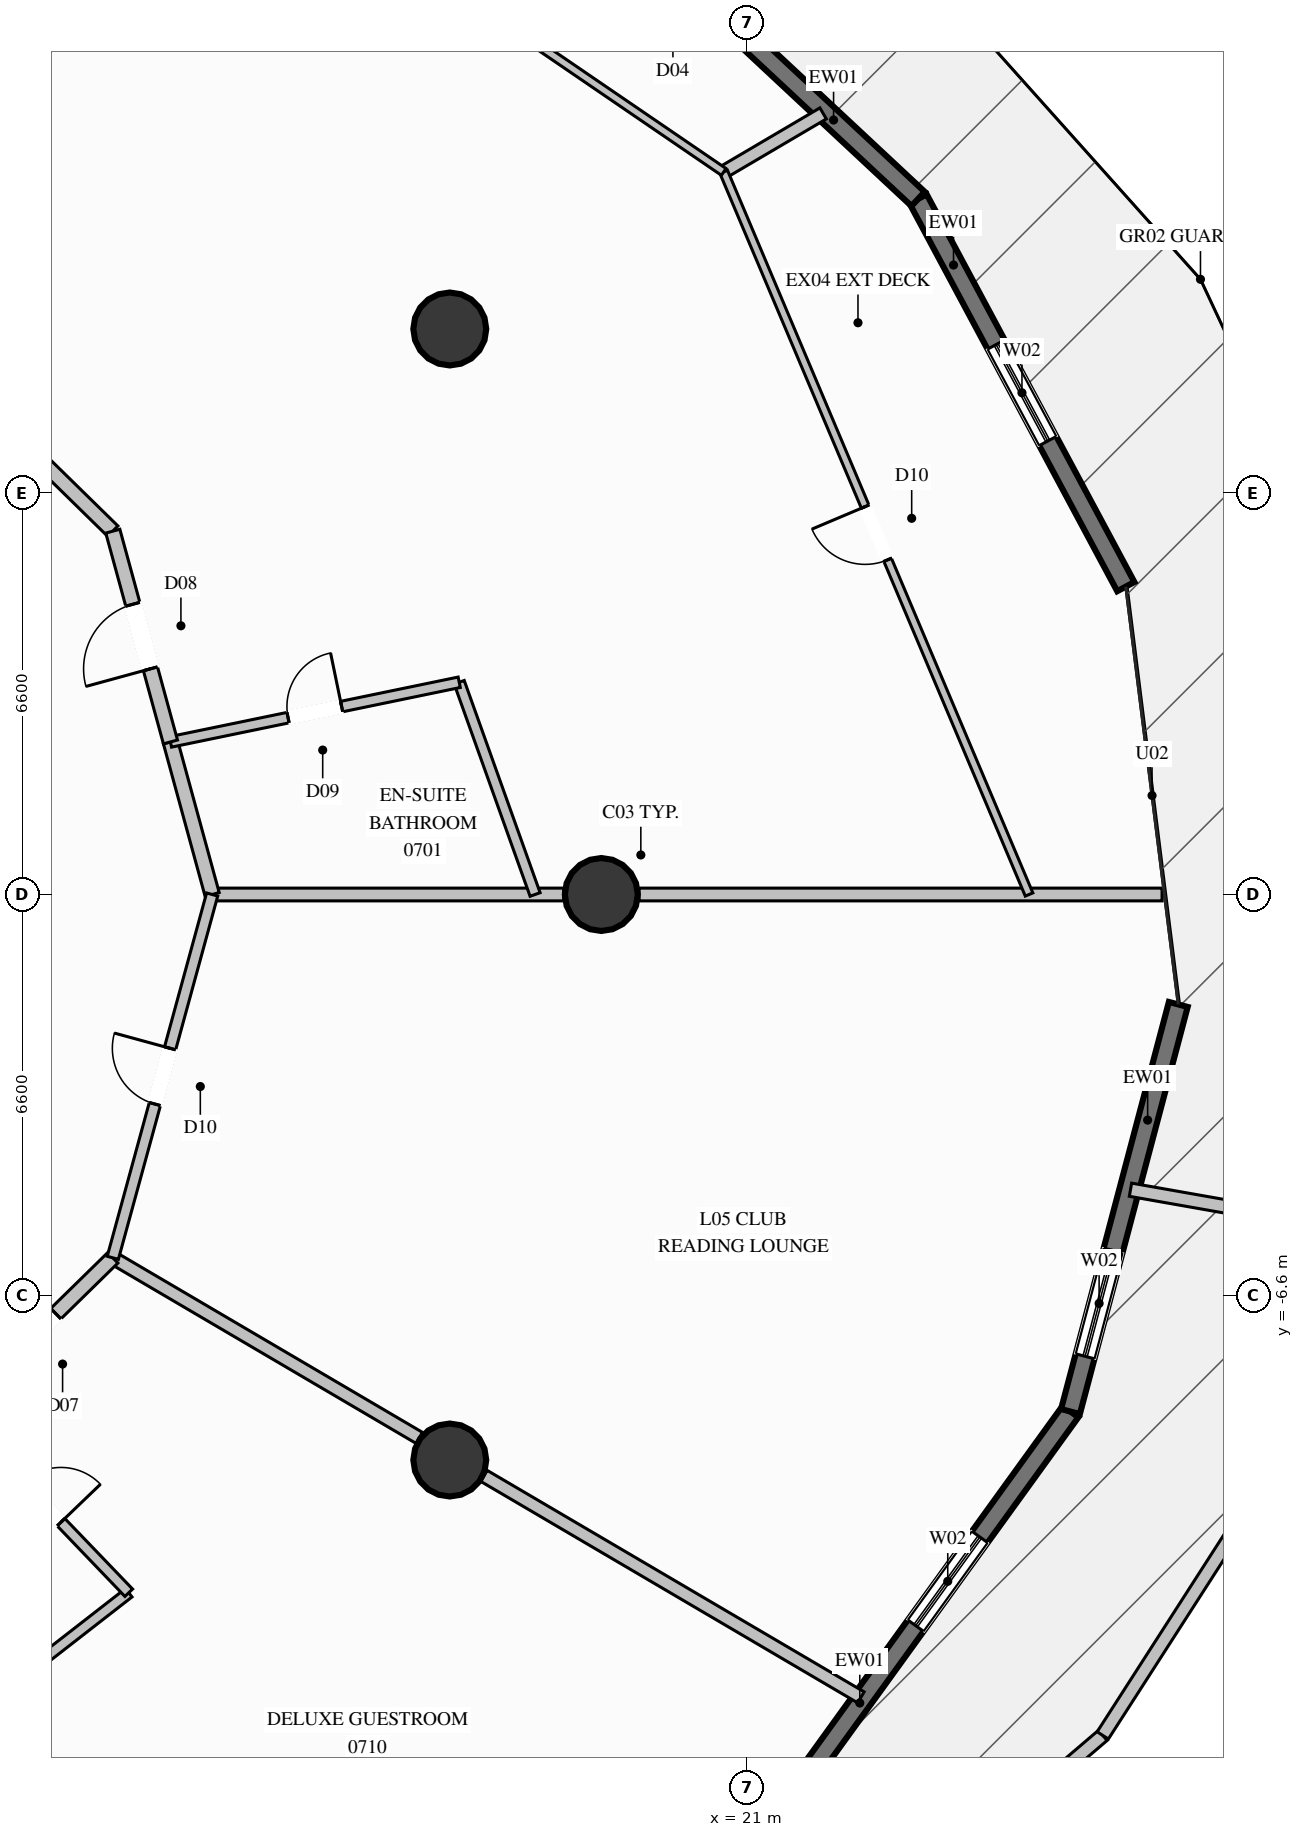
"""IFC4 building model, lengths in metres.
Left out: names, types, materials, properties, quantities, classifications, styles, units other than length and angle.
Written with IfcOpenShell. Run it as: python <this file> out.ifc"""

import sys

from ifc_helpers import new_model, si_unit, direction, frame, frame_2d, origin, origin_2d, place, context, subcontext, project, spatial, rectangle, circle, extrude, element, fill, save


model = new_model("IFC4")
c1 = context("Model", 3, precision=1e-05, world=origin(), true_north=direction((0.0, 1.0)))
c2 = subcontext(c1, "Body", "Model", "MODEL_VIEW")
j1 = project(units=[si_unit("LENGTHUNIT", "METRE"), si_unit("PLANEANGLEUNIT", "RADIAN")], contexts=[c1])
p1 = place(None, origin())
s1 = spatial("IfcSite", under=j1, at=p1, CompositionType="ELEMENT")
p2 = place(p1, origin())
s2 = spatial("IfcBuilding", under=s1, at=p2, CompositionType="ELEMENT")
p3 = place(p2, frame((0.0, 0.0, 28.4)))
s3 = spatial("IfcBuildingStorey", under=s2, at=p3, CompositionType="ELEMENT", Elevation=28.4)
for number, where, z_axis, x_axis in (
    (1, (18.6, 0.0, 0.0), (0.0, 0.0, 1.0), (1.0, 0.0, 0.0)),
    (2, (16.108, 9.3, 0.0), (0.0, 0.0, 1.0), (1.0, 0.0, 0.0)),
    (3, (16.108, -9.3, 0.0), (0.0, 0.0, 1.0), (1.0, 0.0, 0.0)),
):
    element("IfcColumn", number, at=place(p3, frame(where, z_axis=z_axis, x_axis=x_axis)), inside=s3, PredefinedType="COLUMN", context=c2, shape_type="SweptSolid", body=[
        extrude(circle(Radius=0.6, at=origin_2d()), origin(), (0.0, 0.0, 1.0), 3.6),
    ])
p4 = place(p3, frame((23.81, 11.439, 0.0), z_axis=(0.0, 0.0, 1.0), x_axis=(0.472255130515, -0.881461905985, 0.0)))
e4 = element("IfcWall", 4, at=p4, inside=s3, PredefinedType="SOLIDWALL", context=c2, shape_type="SweptSolid", body=[
    extrude(rectangle(XDim=7.233, YDim=0.32, at=frame_2d((3.617, 0.0))), origin(), (0.0, 0.0, 1.0), 3.34),
])
p5 = place(p4, frame((2.717, 0.0, 0.35)))
e5 = element("IfcOpeningElement", 5, at=p5, cuts=e4, PredefinedType="OPENING", context=c2, shape_type="SweptSolid", body=[
    extrude(rectangle(XDim=1.8, YDim=2.6, at=frame_2d((0.9, 1.3))), frame((0.0, 0.17, 0.0), z_axis=(0.0, -1.0, 0.0), x_axis=(1.0, 0.0, 0.0)), (0.0, 0.0, 1.0), 0.34),
])
p6 = place(p3, frame((18.177, 16.696, 0.0), z_axis=(0.0, 0.0, 1.0), x_axis=(0.731083716984, -0.682287768292, 0.0)))
e6 = element("IfcWall", 6, at=p6, inside=s3, PredefinedType="SOLIDWALL", context=c2, shape_type="SweptSolid", body=[
    extrude(rectangle(XDim=7.705, YDim=0.32, at=frame_2d((3.853, 0.0))), origin(), (0.0, 0.0, 1.0), 3.34),
])
p7 = place(p6, frame((2.052, 0.0, 0.0)))
e7 = element("IfcOpeningElement", 7, at=p7, cuts=e6, PredefinedType="OPENING", context=c2, shape_type="SweptSolid", body=[
    extrude(rectangle(XDim=1.6, YDim=2.3, at=frame_2d((0.8, 1.15))), frame((0.0, 0.17, 0.0), z_axis=(0.0, -1.0, 0.0), x_axis=(1.0, 0.0, 0.0)), (0.0, 0.0, 1.0), 0.34),
])
p8 = place(p3, frame((26.316, -8.503, 0.0), z_axis=(0.0, 0.0, 1.0), x_axis=(-0.585883584877, -0.810395227634, 0.0)))
e8 = element("IfcWall", 8, at=p8, inside=s3, PredefinedType="SOLIDWALL", context=c2, shape_type="SweptSolid", body=[
    extrude(rectangle(XDim=7.234, YDim=0.32, at=frame_2d((3.617, 0.0))), origin(), (0.0, 0.0, 1.0), 3.34),
])
p9 = place(p8, frame((2.545, 0.0, 0.35)))
e9 = element("IfcOpeningElement", 9, at=p9, cuts=e8, PredefinedType="OPENING", context=c2, shape_type="SweptSolid", body=[
    extrude(rectangle(XDim=1.8, YDim=2.6, at=frame_2d((0.9, 1.3))), frame((0.0, 0.17, 0.0), z_axis=(0.0, -1.0, 0.0), x_axis=(1.0, 0.0, 0.0)), (0.0, 0.0, 1.0), 0.34),
])
p10 = place(p3, frame((28.089, -1.808, 0.0), z_axis=(0.0, 0.0, 1.0), x_axis=(-0.256032082016, -0.966668284873, 0.0)))
e10 = element("IfcWall", 10, at=p10, inside=s3, PredefinedType="SOLIDWALL", context=c2, shape_type="SweptSolid", body=[
    extrude(rectangle(XDim=6.926, YDim=0.32, at=frame_2d((3.463, 0.0))), origin(), (0.0, 0.0, 1.0), 3.34),
])
p11 = place(p10, frame((4.186, 0.0, 0.35)))
e11 = element("IfcOpeningElement", 11, at=p11, cuts=e10, PredefinedType="OPENING", context=c2, shape_type="SweptSolid", body=[
    extrude(rectangle(XDim=1.8, YDim=2.6, at=frame_2d((0.9, 1.3))), frame((0.0, 0.17, 0.0), z_axis=(0.0, -1.0, 0.0), x_axis=(1.0, 0.0, 0.0)), (0.0, 0.0, 1.0), 0.34),
])
p12 = place(p3, frame((21.44, -18.448, 0.0), z_axis=(0.0, 0.0, 1.0), x_axis=(0.760343653317, 0.649520999553, 0.0)))
e12 = element("IfcWall", 12, at=p12, inside=s3, PredefinedType="PARAPET", context=c2, shape_type="SweptSolid", body=[
    extrude(rectangle(XDim=7.111, YDim=0.22, at=frame_2d((3.556, 0.0))), origin(), (0.0, 0.0, 1.0), 1.15),
])
p13 = place(p3, frame((26.847, -13.829, 0.0), z_axis=(0.0, 0.0, 1.0), x_axis=(0.540992703038, 0.841027285681, 0.0)))
e13 = element("IfcWall", 13, at=p13, inside=s3, PredefinedType="PARAPET", context=c2, shape_type="SweptSolid", body=[
    extrude(rectangle(XDim=6.612, YDim=0.22, at=frame_2d((3.306, 0.0))), origin(), (0.0, 0.0, 1.0), 1.15),
])
p14 = place(p3, frame((31.098, -5.524, 0.0), z_axis=(0.0, 0.0, 1.0), x_axis=(-0.984816707484, 0.173597386677, 0.0)))
e14 = element("IfcWall", 14, at=p14, inside=s3, PredefinedType="PARAPET", context=c2, shape_type="SweptSolid", body=[
    extrude(rectangle(XDim=3.854, YDim=0.22, at=frame_2d((1.927, 0.0))), origin(), (0.0, 0.0, 1.0), 1.15),
])
p15 = place(p3, frame((12.2, 0.0, 0.0), z_axis=(0.0, 0.0, 1.0), x_axis=(1.0, 0.0, 0.0)))
e15 = element("IfcWall", 15, at=p15, inside=s3, PredefinedType="PARTITIONING", context=c2, shape_type="SweptSolid", body=[
    extrude(rectangle(XDim=5.78, YDim=0.21, at=frame_2d((2.89, 0.0))), origin(), (0.0, 0.0, 1.0), 2.708),
])
p16 = place(p3, frame((19.22, 0.0, 0.0), z_axis=(0.0, 0.0, 1.0), x_axis=(1.0, 0.0, 0.0)))
e16 = element("IfcWall", 16, at=p16, inside=s3, PredefinedType="PARTITIONING", context=c2, shape_type="SweptSolid", body=[
    extrude(rectangle(XDim=8.602, YDim=0.21, at=frame_2d((4.301, 0.0))), origin(), (0.0, 0.0, 1.0), 3.34),
])
p17 = place(p3, frame((10.566, -5.975, 0.0), z_axis=(0.0, 0.0, 1.0), x_axis=(0.862217531027, -0.506538181374, 0.0)))
e17 = element("IfcWall", 17, at=p17, inside=s3, PredefinedType="PARTITIONING", context=c2, shape_type="SweptSolid", body=[
    extrude(rectangle(XDim=5.845, YDim=0.21, at=frame_2d((2.923, 0.0))), origin(), (0.0, 0.0, 1.0), 2.708),
])
p18 = place(p3, frame((16.67, -9.561, 0.0), z_axis=(0.0, 0.0, 1.0), x_axis=(0.862214298177, -0.506543684215, 0.0)))
e18 = element("IfcWall", 18, at=p18, inside=s3, PredefinedType="PARTITIONING", context=c2, shape_type="SweptSolid", body=[
    extrude(rectangle(XDim=7.19, YDim=0.21, at=frame_2d((3.595, 0.0))), origin(), (0.0, 0.0, 1.0), 3.34),
])
p19 = place(p3, frame((12.2, 0.0, 0.0), z_axis=(0.0, 0.0, 1.0), x_axis=(-0.263744763784, 0.964592504416, 0.0)))
e19 = element("IfcWall", 19, at=p19, inside=s3, PredefinedType="PARTITIONING", context=c2, shape_type="SweptSolid", body=[
    extrude(rectangle(XDim=2.601, YDim=0.24, at=frame_2d((1.301, 0.0))), origin(), (0.0, 0.0, 1.0), 2.919),
])
p20 = place(p3, frame((17.511, 0.0, 0.0), z_axis=(0.0, 0.0, 1.0), x_axis=(-0.336724431673, 0.94160323763, 0.0)))
e20 = element("IfcWall", 20, at=p20, inside=s3, PredefinedType="PLUMBINGWALL", context=c2, shape_type="SweptSolid", body=[
    extrude(rectangle(XDim=3.707, YDim=0.175, at=frame_2d((1.853, 0.0))), origin(), (0.0, 0.0, 1.0), 3.34),
])
p21 = place(p3, frame((11.514, 2.509, 0.0), z_axis=(0.0, 0.0, 1.0), x_axis=(0.979325812174, 0.202289281992, 0.0)))
e21 = element("IfcWall", 21, at=p21, inside=s3, PredefinedType="PLUMBINGWALL", context=c2, shape_type="SweptSolid", body=[
    extrude(rectangle(XDim=4.849, YDim=0.175, at=frame_2d((2.425, 0.0))), origin(), (0.0, 0.0, 1.0), 3.34),
])
p22 = place(p21, frame((1.975, 0.0, 0.0)))
e22 = element("IfcOpeningElement", 22, at=p22, cuts=e21, PredefinedType="OPENING", context=c2, shape_type="SweptSolid", body=[
    extrude(rectangle(XDim=0.9, YDim=2.1, at=frame_2d((0.45, 1.05))), frame((0.0, 0.098, 0.0), z_axis=(0.0, -1.0, 0.0), x_axis=(1.0, 0.0, 0.0)), (0.0, 0.0, 1.0), 0.195),
])
p23 = place(p3, frame((20.613, 11.883, 0.0), z_axis=(0.0, 0.0, 1.0), x_axis=(0.861901128596, 0.507076369519, 0.0)))
e23 = element("IfcWall", 23, at=p23, inside=s3, PredefinedType="PARTITIONING", context=c2, shape_type="SweptSolid", body=[
    extrude(rectangle(XDim=1.897, YDim=0.21, at=frame_2d((0.948, 0.0))), origin(), (0.0, 0.0, 1.0), 3.34),
])
p24 = place(p3, frame((10.566, 5.975, 0.0), z_axis=(0.0, 0.0, 1.0), x_axis=(-0.714411174131, 0.699726142342, 0.0)))
e24 = element("IfcWall", 24, at=p24, inside=s3, PredefinedType="PARTITIONING", context=c2, shape_type="SweptSolid", body=[
    extrude(rectangle(XDim=6.251, YDim=0.24, at=frame_2d((3.125, 0.0))), origin(), (0.0, 0.0, 1.0), 3.34),
])
p25 = place(p3, frame((11.514, 2.509, 0.0), z_axis=(0.0, 0.0, 1.0), x_axis=(-0.263818706543, 0.96457228349, 0.0)))
e25 = element("IfcWall", 25, at=p25, inside=s3, PredefinedType="PARTITIONING", context=c2, shape_type="SweptSolid", body=[
    extrude(rectangle(XDim=3.593, YDim=0.24, at=frame_2d((1.797, 0.0))), origin(), (0.0, 0.0, 1.0), 2.919),
])
p26 = place(p25, frame((1.247, 0.0, 0.0)))
e26 = element("IfcOpeningElement", 26, at=p26, cuts=e25, PredefinedType="OPENING", context=c2, shape_type="SweptSolid", body=[
    extrude(rectangle(XDim=1.1, YDim=2.3, at=frame_2d((0.55, 1.15))), frame((0.0, 0.13, 0.0), z_axis=(0.0, -1.0, 0.0), x_axis=(1.0, 0.0, 0.0)), (0.0, 0.0, 1.0), 0.26),
])
p27 = place(p3, frame((25.635, 0.0, 0.0), z_axis=(0.0, 0.0, 1.0), x_axis=(-0.389280036571, 0.921119456491, 0.0)))
e27 = element("IfcWall", 27, at=p27, inside=s3, PredefinedType="PARTITIONING", context=c2, shape_type="SweptSolid", body=[
    extrude(rectangle(XDim=12.901, YDim=0.135, at=frame_2d((6.45, 0.0))), origin(), (0.0, 0.0, 1.0), 3.34),
])
p28 = place(p27, frame((5.975, 0.0, 0.0)))
e28 = element("IfcOpeningElement", 28, at=p28, cuts=e27, PredefinedType="OPENING", context=c2, shape_type="SweptSolid", body=[
    extrude(rectangle(XDim=0.95, YDim=2.1, at=frame_2d((0.475, 1.05))), frame((0.0, 0.078, 0.0), z_axis=(0.0, -1.0, 0.0), x_axis=(1.0, 0.0, 0.0)), (0.0, 0.0, 1.0), 0.155),
])
p29 = place(p3, frame((20.613, 11.883, 0.0), z_axis=(0.0, 0.0, 1.0), x_axis=(-0.825894658533, 0.563824452295, 0.0)))
e29 = element("IfcWall", 29, at=p29, inside=s3, PredefinedType="PARTITIONING", context=c2, shape_type="SweptSolid", body=[
    extrude(rectangle(XDim=11.929, YDim=0.135, at=frame_2d((5.964, 0.0))), origin(), (0.0, 0.0, 1.0), 3.34),
])
p30 = place(p29, frame((5.489, 0.0, 0.0)))
e30 = element("IfcOpeningElement", 30, at=p30, cuts=e29, PredefinedType="OPENING", context=c2, shape_type="SweptSolid", body=[
    extrude(rectangle(XDim=0.95, YDim=2.1, at=frame_2d((0.475, 1.05))), frame((0.0, 0.078, 0.0), z_axis=(0.0, -1.0, 0.0), x_axis=(1.0, 0.0, 0.0)), (0.0, 0.0, 1.0), 0.155),
])
p31 = place(p3, frame((7.988, -13.692, 0.0), z_axis=(0.0, 0.0, 1.0), x_axis=(0.78932298539, 0.613978195651, 0.0)))
e31 = element("IfcWall", 31, at=p31, inside=s3, PredefinedType="PLUMBINGWALL", context=c2, shape_type="SweptSolid", body=[
    extrude(rectangle(XDim=3.598, YDim=0.175, at=frame_2d((1.799, 0.0))), origin(), (0.0, 0.0, 1.0), 3.34),
])
p32 = place(p3, frame((7.976, -8.512, 0.0), z_axis=(0.0, 0.0, 1.0), x_axis=(0.692493571669, -0.721424045342, 0.0)))
e32 = element("IfcWall", 32, at=p32, inside=s3, PredefinedType="PLUMBINGWALL", context=c2, shape_type="SweptSolid", body=[
    extrude(rectangle(XDim=4.118, YDim=0.175, at=frame_2d((2.059, 0.0))), origin(), (0.0, 0.0, 1.0), 3.34),
])
p33 = place(p32, frame((1.609, 0.0, 0.0)))
e33 = element("IfcOpeningElement", 33, at=p33, cuts=e32, PredefinedType="OPENING", context=c2, shape_type="SweptSolid", body=[
    extrude(rectangle(XDim=0.9, YDim=2.1, at=frame_2d((0.45, 1.05))), frame((0.0, 0.098, 0.0), z_axis=(0.0, -1.0, 0.0), x_axis=(1.0, 0.0, 0.0)), (0.0, 0.0, 1.0), 0.195),
])
p34 = place(p3, frame((7.976, -8.512, 0.0), z_axis=(0.0, 0.0, 1.0), x_axis=(0.714375756875, 0.699762301064, 0.0)))
e34 = element("IfcWall", 34, at=p34, inside=s3, PredefinedType="PARTITIONING", context=c2, shape_type="SweptSolid", body=[
    extrude(rectangle(XDim=3.625, YDim=0.24, at=frame_2d((1.812, 0.0))), origin(), (0.0, 0.0, 1.0), 3.34),
])
p35 = place(p34, frame((1.313, 0.0, 0.0)))
e35 = element("IfcOpeningElement", 35, at=p35, cuts=e34, PredefinedType="OPENING", context=c2, shape_type="SweptSolid", body=[
    extrude(rectangle(XDim=1.0, YDim=2.2, at=frame_2d((0.5, 1.1))), frame((0.0, 0.13, 0.0), z_axis=(0.0, -1.0, 0.0), x_axis=(1.0, 0.0, 0.0)), (0.0, 0.0, 1.0), 0.26),
])
p36 = place(p3, frame((10.566, -5.975, 0.0), z_axis=(0.0, 0.0, 1.0), x_axis=(0.263787657435, 0.964580775148, 0.0)))
e36 = element("IfcWall", 36, at=p36, inside=s3, PredefinedType="PARTITIONING", context=c2, shape_type="SweptSolid", body=[
    extrude(rectangle(XDim=6.195, YDim=0.19, at=frame_2d((3.097, 0.0))), origin(), (0.0, 0.0, 1.0), 2.919),
])
p37 = place(p36, frame((2.622, 0.0, 0.0)))
e37 = element("IfcOpeningElement", 37, at=p37, cuts=e36, PredefinedType="OPENING", context=c2, shape_type="SweptSolid", body=[
    extrude(rectangle(XDim=0.95, YDim=2.1, at=frame_2d((0.475, 1.05))), frame((0.0, 0.105, 0.0), z_axis=(0.0, -1.0, 0.0), x_axis=(1.0, 0.0, 0.0)), (0.0, 0.0, 1.0), 0.21),
])
p38 = place(p5, origin())
e38 = element("IfcWindow", 38, at=p38, inside=s3, PartitioningType="SINGLE_PANEL", PredefinedType="WINDOW", context=c2, shape_type="SweptSolid", body=[
    extrude(rectangle(XDim=1.8, YDim=2.6, at=frame_2d((0.9, 1.3))), frame((0.0, 0.03, 0.0), z_axis=(0.0, -1.0, 0.0), x_axis=(1.0, 0.0, 0.0)), (0.0, 0.0, 1.0), 0.06),
])
fill(e5, e38)
p39 = place(p9, origin())
e39 = element("IfcWindow", 39, at=p39, inside=s3, PartitioningType="SINGLE_PANEL", PredefinedType="WINDOW", context=c2, shape_type="SweptSolid", body=[
    extrude(rectangle(XDim=1.8, YDim=2.6, at=frame_2d((0.9, 1.3))), frame((0.0, 0.03, 0.0), z_axis=(0.0, -1.0, 0.0), x_axis=(1.0, 0.0, 0.0)), (0.0, 0.0, 1.0), 0.06),
])
fill(e9, e39)
p40 = place(p11, origin())
e40 = element("IfcWindow", 40, at=p40, inside=s3, PartitioningType="SINGLE_PANEL", PredefinedType="WINDOW", context=c2, shape_type="SweptSolid", body=[
    extrude(rectangle(XDim=1.8, YDim=2.6, at=frame_2d((0.9, 1.3))), frame((0.0, 0.03, 0.0), z_axis=(0.0, -1.0, 0.0), x_axis=(1.0, 0.0, 0.0)), (0.0, 0.0, 1.0), 0.06),
])
fill(e11, e40)
p41 = place(p22, origin())
e41 = element("IfcDoor", 41, at=p41, inside=s3, OperationType="SINGLE_SWING_RIGHT", PredefinedType="DOOR", context=c2, shape_type="SweptSolid", body=[
    extrude(rectangle(XDim=0.9, YDim=2.1, at=frame_2d((0.45, 1.05))), frame((0.0, 0.025, 0.0), z_axis=(0.0, -1.0, 0.0), x_axis=(1.0, 0.0, 0.0)), (0.0, 0.0, 1.0), 0.05),
])
fill(e22, e41)
p42 = place(p26, origin())
e42 = element("IfcDoor", 42, at=p42, inside=s3, OperationType="SINGLE_SWING_LEFT", PredefinedType="DOOR", context=c2, shape_type="SweptSolid", body=[
    extrude(rectangle(XDim=1.1, YDim=2.3, at=frame_2d((0.55, 1.15))), frame((0.0, 0.025, 0.0), z_axis=(0.0, -1.0, 0.0), x_axis=(1.0, 0.0, 0.0)), (0.0, 0.0, 1.0), 0.05),
])
fill(e26, e42)
p43 = place(p28, origin())
e43 = element("IfcDoor", 43, at=p43, inside=s3, OperationType="SINGLE_SWING_RIGHT", PredefinedType="DOOR", context=c2, shape_type="SweptSolid", body=[
    extrude(rectangle(XDim=0.95, YDim=2.1, at=frame_2d((0.475, 1.05))), frame((0.0, 0.025, 0.0), z_axis=(0.0, -1.0, 0.0), x_axis=(1.0, 0.0, 0.0)), (0.0, 0.0, 1.0), 0.05),
])
fill(e28, e43)
p44 = place(p33, origin())
e44 = element("IfcDoor", 44, at=p44, inside=s3, OperationType="SINGLE_SWING_RIGHT", PredefinedType="DOOR", context=c2, shape_type="SweptSolid", body=[
    extrude(rectangle(XDim=0.9, YDim=2.1, at=frame_2d((0.45, 1.05))), frame((0.0, 0.025, 0.0), z_axis=(0.0, -1.0, 0.0), x_axis=(1.0, 0.0, 0.0)), (0.0, 0.0, 1.0), 0.05),
])
fill(e33, e44)
p45 = place(p35, origin())
e45 = element("IfcDoor", 45, at=p45, inside=s3, OperationType="SINGLE_SWING_LEFT", PredefinedType="DOOR", context=c2, shape_type="SweptSolid", body=[
    extrude(rectangle(XDim=1.0, YDim=2.2, at=frame_2d((0.5, 1.1))), frame((0.0, 0.025, 0.0), z_axis=(0.0, -1.0, 0.0), x_axis=(1.0, 0.0, 0.0)), (0.0, 0.0, 1.0), 0.05),
])
fill(e35, e45)
p46 = place(p37, origin())
e46 = element("IfcDoor", 46, at=p46, inside=s3, OperationType="SINGLE_SWING_RIGHT", PredefinedType="DOOR", context=c2, shape_type="SweptSolid", body=[
    extrude(rectangle(XDim=0.95, YDim=2.1, at=frame_2d((0.475, 1.05))), frame((0.0, 0.025, 0.0), z_axis=(0.0, -1.0, 0.0), x_axis=(1.0, 0.0, 0.0)), (0.0, 0.0, 1.0), 0.05),
])
fill(e37, e46)
save(model, sys.argv[1])
